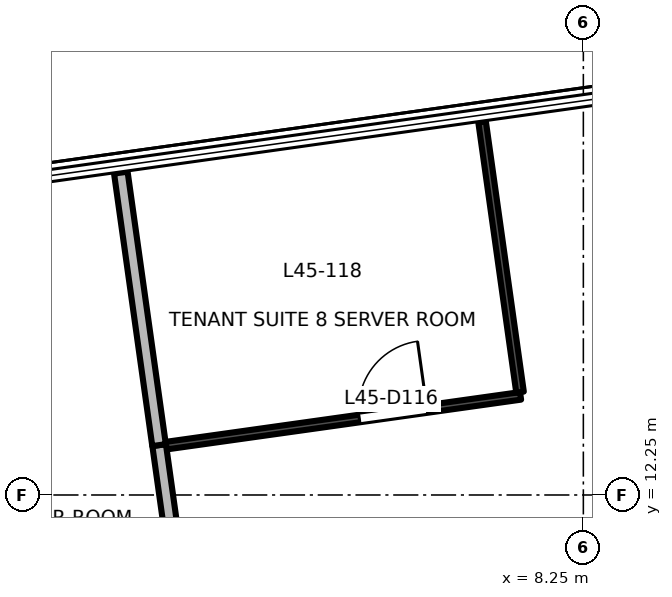
"""IFC4 building model, lengths in metres.
Left out: names, types, materials, properties, quantities, classifications, styles, units other than length and angle.
Written with IfcOpenShell. Run it as: python <this file> out.ifc"""

import sys

from ifc_helpers import new_model, si_unit, direction, frame, frame_2d, origin, place, context, subcontext, project, spatial, rectangle, extrude, element, fill, save


model = new_model("IFC4")
c1 = context("Model", 3, precision=1e-05, world=origin(), true_north=direction((0.0, 1.0)))
c2 = subcontext(c1, "Body", "Model", "MODEL_VIEW")
j1 = project(units=[si_unit("LENGTHUNIT", "METRE"), si_unit("PLANEANGLEUNIT", "RADIAN")], contexts=[c1])
p1 = place(None, origin())
s1 = spatial("IfcSite", under=j1, at=p1, CompositionType="ELEMENT")
p2 = place(p1, origin())
s2 = spatial("IfcBuilding", under=s1, at=p2, CompositionType="ELEMENT")
p3 = place(p2, frame((0.0, 0.0, 195.8)))
s3 = spatial("IfcBuildingStorey", under=s2, at=p3, CompositionType="ELEMENT", Elevation=195.8)
p4 = place(p3, frame((2.669, 12.906, 0.0), z_axis=(0.0, 0.0, 1.0), x_axis=(0.139066846741, -0.990282995985, 0.0)))
e1 = element("IfcWall", 1, at=p4, inside=s3, PredefinedType="PARTITIONING", context=c2, shape_type="SweptSolid", body=[
    extrude(rectangle(XDim=3.92, YDim=0.18, at=frame_2d((1.96, 0.0))), origin(), (0.0, 0.0, 1.0), 3.7),
])
p5 = place(p3, frame((2.165, 16.491, 0.0), z_axis=(0.0, 0.0, 1.0), x_axis=(0.138928291597, -0.990302443597, 0.0)))
e2 = element("IfcWall", 2, at=p5, inside=s3, PredefinedType="PARTITIONING", context=c2, shape_type="SweptSolid", body=[
    extrude(rectangle(XDim=3.62, YDim=0.18, at=frame_2d((1.81, 0.0))), origin(), (0.0, 0.0, 1.0), 3.7),
])
p6 = place(p3, frame((2.761, 12.899, 0.0), z_axis=(0.0, 0.0, 1.0), x_axis=(0.990277569518, 0.139105482671, 0.0)))
e3 = element("IfcWall", 3, at=p6, inside=s3, PredefinedType="PARTITIONING", context=c2, shape_type="SweptSolid", body=[
    extrude(rectangle(XDim=4.709, YDim=0.1, at=frame_2d((2.354, 0.0))), origin(), (0.0, 0.0, 1.0), 3.25),
])
p7 = place(p6, frame((2.566, 0.0, 0.0)))
e4 = element("IfcOpeningElement", 4, at=p7, cuts=e3, PredefinedType="OPENING", context=c2, shape_type="SweptSolid", body=[
    extrude(rectangle(XDim=0.9, YDim=2.1, at=frame_2d((0.45, 1.05))), frame((0.0, 0.061, 0.0), z_axis=(0.0, -1.0, 0.0), x_axis=(1.0, 0.0, 0.0)), (0.0, 0.0, 1.0), 0.121),
])
p8 = place(p3, frame((7.417, 13.603, 0.0), z_axis=(0.0, 0.0, 1.0), x_axis=(-0.139012030438, 0.990290692369, 0.0)))
e5 = element("IfcWall", 5, at=p8, inside=s3, PredefinedType="PARTITIONING", context=c2, shape_type="SweptSolid", body=[
    extrude(rectangle(XDim=3.59, YDim=0.1, at=frame_2d((1.795, 0.0))), origin(), (0.0, 0.0, 1.0), 3.7),
])
p9 = place(p7, origin())
e6 = element("IfcDoor", 6, at=p9, inside=s3, OperationType="SINGLE_SWING_RIGHT", PredefinedType="DOOR", context=c2, shape_type="SweptSolid", body=[
    extrude(rectangle(XDim=0.9, YDim=2.1, at=frame_2d((0.45, 1.05))), frame((0.0, 0.025, 0.0), z_axis=(0.0, -1.0, 0.0), x_axis=(1.0, 0.0, 0.0)), (0.0, 0.0, 1.0), 0.05),
])
fill(e4, e6)
save(model, sys.argv[1])
